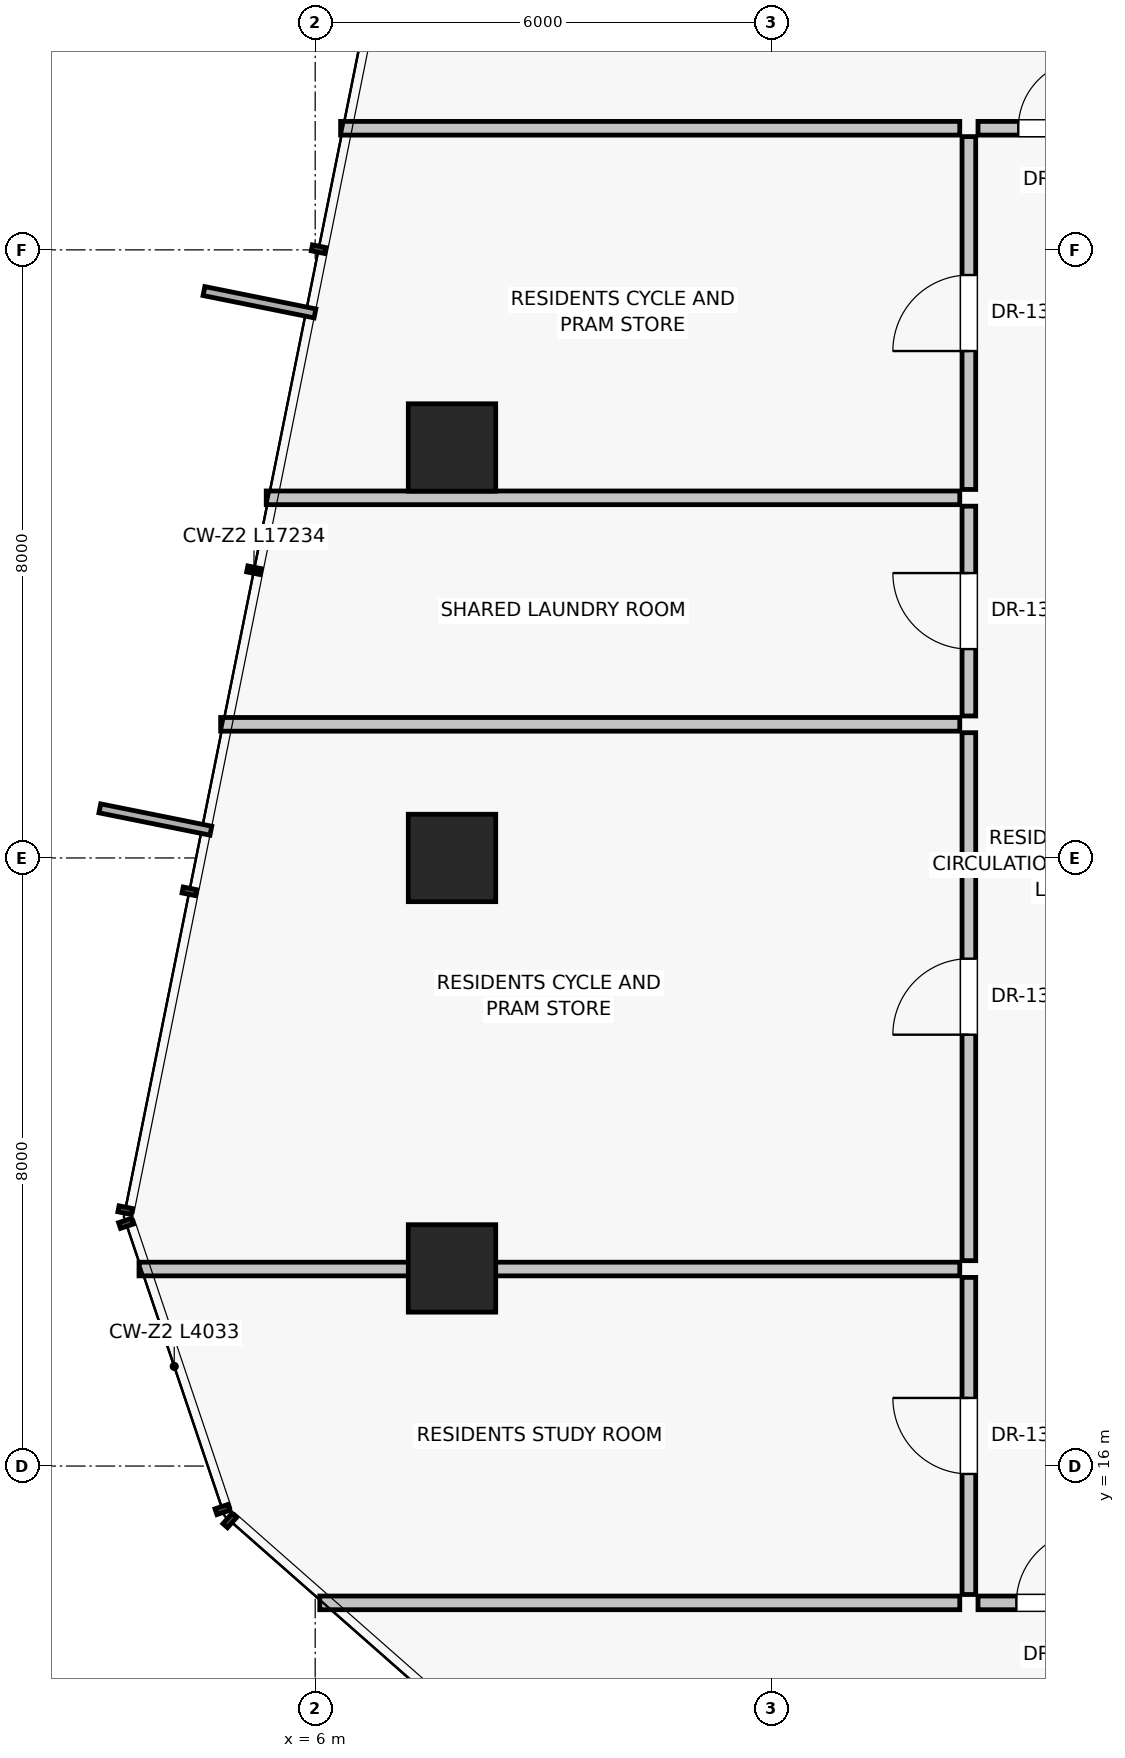
"""IFC4 building model, lengths in metres.
Left out: names, types, materials, properties, quantities, classifications, styles, units other than length and angle.
Written with IfcOpenShell. Run it as: python <this file> out.ifc"""

import sys

from ifc_helpers import new_model, si_unit, direction, frame, frame_2d, origin, origin_2d, place, context, subcontext, project, spatial, rectangle, extrude, source, transform, mapped, element, fill, save


model = new_model("IFC4")
c1 = context("Model", 3, precision=1e-05, world=origin(), true_north=direction((0.0, 1.0)))
c2 = subcontext(c1, "Body", "Model", "MODEL_VIEW")
j1 = project(units=[si_unit("LENGTHUNIT", "METRE"), si_unit("PLANEANGLEUNIT", "RADIAN")], contexts=[c1])
p1 = place(None, origin())
s1 = spatial("IfcSite", under=j1, at=p1, CompositionType="ELEMENT")
p2 = place(p1, origin())
s2 = spatial("IfcBuilding", under=s1, at=p2, CompositionType="ELEMENT")
p3 = place(p2, frame((0.0, 0.0, 89.45)))
s3 = spatial("IfcBuildingStorey", under=s2, at=p3, CompositionType="ELEMENT", Elevation=89.45)
for number, where, z_axis, x_axis in (
    (1, (7.8, 29.4, 0.0), (0.0, 0.0, 1.0), (1.0, 0.0, 0.0)),
    (2, (7.8, 24.0, 0.0), (0.0, 0.0, 1.0), (1.0, 0.0, 0.0)),
    (3, (7.8, 18.6, 0.0), (0.0, 0.0, 1.0), (1.0, 0.0, 0.0)),
):
    element("IfcColumn", number, at=place(p3, frame(where, z_axis=z_axis, x_axis=x_axis)), inside=s3, PredefinedType="COLUMN", context=c2, shape_type="SweptSolid", body=[
        extrude(rectangle(XDim=1.15, YDim=1.15, at=origin_2d()), origin(), (0.0, 0.0, 1.0), 3.25),
    ])
p4 = place(p3, frame((14.48, 14.2, 0.0), z_axis=(0.0, 0.0, 1.0), x_axis=(-1.0, 0.0, 0.0)))
e4 = element("IfcWall", 4, at=p4, inside=s3, PredefinedType="PARTITIONING", context=c2, shape_type="SweptSolid", body=[
    extrude(rectangle(XDim=8.42, YDim=0.18, at=frame_2d((4.21, 0.0))), origin(), (0.0, 0.0, 1.0), 3.0),
])
p5 = place(p3, frame((14.48, 33.6, 0.0), z_axis=(0.0, 0.0, 1.0), x_axis=(-1.0, 0.0, 0.0)))
e5 = element("IfcWall", 5, at=p5, inside=s3, PredefinedType="PARTITIONING", context=c2, shape_type="SweptSolid", body=[
    extrude(rectangle(XDim=8.146, YDim=0.18, at=frame_2d((4.073, 0.0))), origin(), (0.0, 0.0, 1.0), 3.0),
])
p6 = place(p3, frame((14.6, 14.31, 0.0), z_axis=(0.0, 0.0, 1.0), x_axis=(0.0, 1.0, 0.0)))
e6 = element("IfcWall", 6, at=p6, inside=s3, PredefinedType="PARTITIONING", context=c2, shape_type="SweptSolid", body=[
    extrude(rectangle(XDim=4.172, YDim=0.18, at=frame_2d((2.086, 0.0))), origin(), (0.0, 0.0, 1.0), 3.0),
])
p7 = place(p6, frame((1.586, 0.0, 0.0)))
e7 = element("IfcOpeningElement", 7, at=p7, cuts=e6, PredefinedType="OPENING", context=c2, shape_type="SweptSolid", body=[
    extrude(rectangle(XDim=1.0, YDim=2.01, at=frame_2d((0.5, 1.005))), frame((0.0, 0.1, 0.0), z_axis=(0.0, -1.0, 0.0), x_axis=(1.0, 0.0, 0.0)), (0.0, 0.0, 1.0), 0.2),
])
p8 = place(p3, frame((14.6, 18.702, 0.0), z_axis=(0.0, 0.0, 1.0), x_axis=(0.0, 1.0, 0.0)))
e8 = element("IfcWall", 8, at=p8, inside=s3, PredefinedType="PARTITIONING", context=c2, shape_type="SweptSolid", body=[
    extrude(rectangle(XDim=6.946, YDim=0.18, at=frame_2d((3.473, 0.0))), origin(), (0.0, 0.0, 1.0), 3.0),
])
p9 = place(p8, frame((2.973, 0.0, 0.0)))
e9 = element("IfcOpeningElement", 9, at=p9, cuts=e8, PredefinedType="OPENING", context=c2, shape_type="SweptSolid", body=[
    extrude(rectangle(XDim=1.0, YDim=2.01, at=frame_2d((0.5, 1.005))), frame((0.0, 0.1, 0.0), z_axis=(0.0, -1.0, 0.0), x_axis=(1.0, 0.0, 0.0)), (0.0, 0.0, 1.0), 0.2),
])
p10 = place(p3, frame((14.48, 18.592, 0.0), z_axis=(0.0, 0.0, 1.0), x_axis=(-1.0, 0.0, 0.0)))
e10 = element("IfcWall", 10, at=p10, inside=s3, PredefinedType="PARTITIONING", context=c2, shape_type="SweptSolid", body=[
    extrude(rectangle(XDim=10.798, YDim=0.18, at=frame_2d((5.399, 0.0))), origin(), (0.0, 0.0, 1.0), 2.378),
])
p11 = place(p3, frame((14.48, 25.758, 0.0), z_axis=(0.0, 0.0, 1.0), x_axis=(-1.0, 0.0, 0.0)))
e11 = element("IfcWall", 11, at=p11, inside=s3, PredefinedType="PARTITIONING", context=c2, shape_type="SweptSolid", body=[
    extrude(rectangle(XDim=9.724, YDim=0.18, at=frame_2d((4.862, 0.0))), origin(), (0.0, 0.0, 1.0), 3.0),
])
p12 = place(p3, frame((14.6, 25.868, 0.0), z_axis=(0.0, 0.0, 1.0), x_axis=(0.0, 1.0, 0.0)))
e12 = element("IfcWall", 12, at=p12, inside=s3, PredefinedType="PARTITIONING", context=c2, shape_type="SweptSolid", body=[
    extrude(rectangle(XDim=2.76, YDim=0.18, at=frame_2d((1.38, 0.0))), origin(), (0.0, 0.0, 1.0), 3.0),
])
p13 = place(p12, frame((0.88, 0.0, 0.0)))
e13 = element("IfcOpeningElement", 13, at=p13, cuts=e12, PredefinedType="OPENING", context=c2, shape_type="SweptSolid", body=[
    extrude(rectangle(XDim=1.0, YDim=2.01, at=frame_2d((0.5, 1.005))), frame((0.0, 0.1, 0.0), z_axis=(0.0, -1.0, 0.0), x_axis=(1.0, 0.0, 0.0)), (0.0, 0.0, 1.0), 0.2),
])
p14 = place(p3, frame((14.6, 28.848, 0.0), z_axis=(0.0, 0.0, 1.0), x_axis=(0.0, 1.0, 0.0)))
e14 = element("IfcWall", 14, at=p14, inside=s3, PredefinedType="PARTITIONING", context=c2, shape_type="SweptSolid", body=[
    extrude(rectangle(XDim=4.642, YDim=0.18, at=frame_2d((2.321, 0.0))), origin(), (0.0, 0.0, 1.0), 3.0),
])
p15 = place(p14, frame((1.821, 0.0, 0.0)))
e15 = element("IfcOpeningElement", 15, at=p15, cuts=e14, PredefinedType="OPENING", context=c2, shape_type="SweptSolid", body=[
    extrude(rectangle(XDim=1.0, YDim=2.01, at=frame_2d((0.5, 1.005))), frame((0.0, 0.1, 0.0), z_axis=(0.0, -1.0, 0.0), x_axis=(1.0, 0.0, 0.0)), (0.0, 0.0, 1.0), 0.2),
])
p16 = place(p3, frame((14.48, 28.738, 0.0), z_axis=(0.0, 0.0, 1.0), x_axis=(-1.0, 0.0, 0.0)))
e16 = element("IfcWall", 16, at=p16, inside=s3, PredefinedType="PARTITIONING", context=c2, shape_type="SweptSolid", body=[
    extrude(rectangle(XDim=9.124, YDim=0.18, at=frame_2d((4.562, 0.0))), origin(), (0.0, 0.0, 1.0), 3.0),
])
p17 = place(p3, frame((14.72, 14.2, 0.0), z_axis=(0.0, 0.0, 1.0), x_axis=(1.0, 0.0, 0.0)))
e17 = element("IfcWall", 17, at=p17, inside=s3, PredefinedType="PARTITIONING", context=c2, shape_type="SweptSolid", body=[
    extrude(rectangle(XDim=1.96, YDim=0.18, at=frame_2d((0.98, 0.0))), origin(), (0.0, 0.0, 1.0), 3.0),
])
p18 = place(p17, frame((0.505, 0.0, 0.0)))
e18 = element("IfcOpeningElement", 18, at=p18, cuts=e17, PredefinedType="OPENING", context=c2, shape_type="SweptSolid", body=[
    extrude(rectangle(XDim=0.95, YDim=2.02, at=frame_2d((0.475, 1.01))), frame((0.0, 0.1, 0.0), z_axis=(0.0, -1.0, 0.0), x_axis=(1.0, 0.0, 0.0)), (0.0, 0.0, 1.0), 0.2),
])
p19 = place(p3, frame((14.72, 33.6, 0.0), z_axis=(0.0, 0.0, 1.0), x_axis=(1.0, 0.0, 0.0)))
e19 = element("IfcWall", 19, at=p19, inside=s3, PredefinedType="PARTITIONING", context=c2, shape_type="SweptSolid", body=[
    extrude(rectangle(XDim=1.96, YDim=0.18, at=frame_2d((0.98, 0.0))), origin(), (0.0, 0.0, 1.0), 3.0),
])
p20 = place(p19, frame((0.53, 0.0, 0.0)))
e20 = element("IfcOpeningElement", 20, at=p20, cuts=e19, PredefinedType="OPENING", context=c2, shape_type="SweptSolid", body=[
    extrude(rectangle(XDim=0.9, YDim=2.01, at=frame_2d((0.45, 1.005))), frame((0.0, 0.1, 0.0), z_axis=(0.0, -1.0, 0.0), x_axis=(1.0, 0.0, 0.0)), (0.0, 0.0, 1.0), 0.2),
])
m1 = source(origin(), c2, "Body", "SweptSolid", [
    extrude(rectangle(XDim=1.0, YDim=2.01, at=frame_2d((0.5, 1.005))), frame((0.0, 0.025, 0.0), z_axis=(0.0, -1.0, 0.0), x_axis=(1.0, 0.0, 0.0)), (0.0, 0.0, 1.0), 0.05),
])
p21 = place(p7, origin())
e21 = element("IfcDoor", 21, at=p21, inside=s3, OperationType="SINGLE_SWING_RIGHT", PredefinedType="DOOR", context=c2, shape_type="MappedRepresentation", body=[
    mapped(m1, transform((0.0, 0.0, 0.0), scale=1.0)),
])
fill(e7, e21)
p22 = place(p9, origin())
e22 = element("IfcDoor", 22, at=p22, inside=s3, OperationType="SINGLE_SWING_LEFT", PredefinedType="DOOR", context=c2, shape_type="MappedRepresentation", body=[
    mapped(m1, transform((0.0, 0.0, 0.0), scale=1.0)),
])
fill(e9, e22)
p23 = place(p13, origin())
e23 = element("IfcDoor", 23, at=p23, inside=s3, OperationType="SINGLE_SWING_RIGHT", PredefinedType="DOOR", context=c2, shape_type="MappedRepresentation", body=[
    mapped(m1, transform((0.0, 0.0, 0.0), scale=1.0)),
])
fill(e13, e23)
p24 = place(p15, origin())
e24 = element("IfcDoor", 24, at=p24, inside=s3, OperationType="SINGLE_SWING_LEFT", PredefinedType="DOOR", context=c2, shape_type="MappedRepresentation", body=[
    mapped(m1, transform((0.0, 0.0, 0.0), scale=1.0)),
])
fill(e15, e24)
m2 = source(origin(), c2, "Body", "SweptSolid", [
    extrude(rectangle(XDim=0.95, YDim=2.02, at=frame_2d((0.475, 1.01))), frame((0.0, 0.025, 0.0), z_axis=(0.0, -1.0, 0.0), x_axis=(1.0, 0.0, 0.0)), (0.0, 0.0, 1.0), 0.05),
])
p25 = place(p18, origin())
e25 = element("IfcDoor", 25, at=p25, inside=s3, OperationType="SINGLE_SWING_RIGHT", PredefinedType="DOOR", context=c2, shape_type="MappedRepresentation", body=[
    mapped(m2, transform((0.0, 0.0, 0.0), scale=1.0)),
])
fill(e18, e25)
m3 = source(origin(), c2, "Body", "SweptSolid", [
    extrude(rectangle(XDim=0.9, YDim=2.01, at=frame_2d((0.45, 1.005))), frame((0.0, 0.025, 0.0), z_axis=(0.0, -1.0, 0.0), x_axis=(1.0, 0.0, 0.0)), (0.0, 0.0, 1.0), 0.05),
])
p26 = place(p20, origin())
e26 = element("IfcDoor", 26, at=p26, inside=s3, OperationType="SINGLE_SWING_RIGHT", PredefinedType="DOOR", context=c2, shape_type="MappedRepresentation", body=[
    mapped(m3, transform((0.0, 0.0, 0.0), scale=1.0)),
])
fill(e20, e26)
save(model, sys.argv[1])
